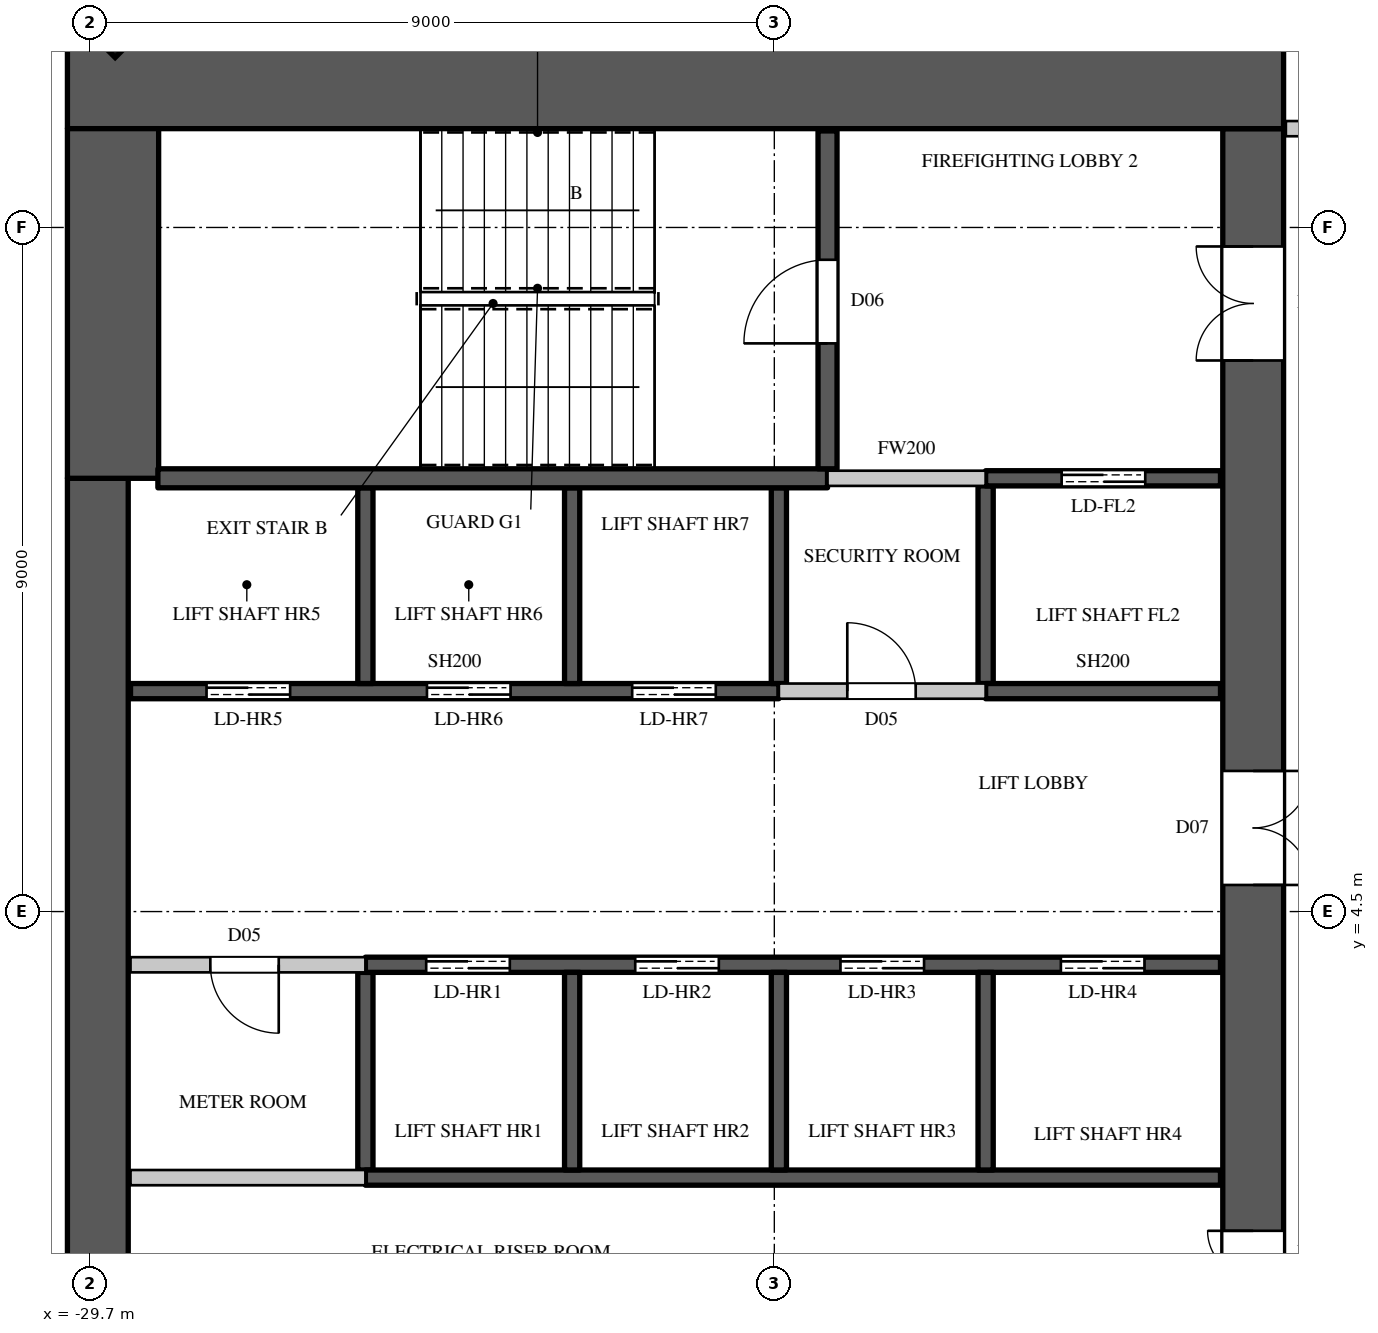
"""IFC4 building model, lengths in metres.
Left out: names, types, materials, properties, quantities, classifications, styles, units other than length and angle.
Written with IfcOpenShell. Run it as: python <this file> out.ifc"""

import sys

from ifc_helpers import new_model, si_unit, direction, frame, frame_2d, origin, origin_2d, place, context, subcontext, project, spatial, rectangle, extrude, element, fill, save


model = new_model("IFC4")
c1 = context("Model", 3, precision=1e-05, world=origin(), true_north=direction((0.0, 1.0)))
c2 = subcontext(c1, "Body", "Model", "MODEL_VIEW")
j1 = project(units=[si_unit("LENGTHUNIT", "METRE"), si_unit("PLANEANGLEUNIT", "RADIAN")], contexts=[c1])
p1 = place(None, origin())
s1 = spatial("IfcSite", under=j1, at=p1, CompositionType="ELEMENT")
p2 = place(p1, origin())
s2 = spatial("IfcBuilding", under=s1, at=p2, CompositionType="ELEMENT")
p3 = place(p2, frame((0.0, 0.0, 217.9)))
s3 = spatial("IfcBuildingStorey", under=s2, at=p3, CompositionType="ELEMENT", Elevation=217.9)
p4 = place(p3, frame((-29.443, 16.443, 0.0), z_axis=(0.0, 0.0, 1.0), x_axis=(-0.707106781187, -0.707106781187, 0.0)))
e1 = element("IfcColumn", 1, at=p4, inside=s3, PredefinedType="COLUMN", context=c2, shape_type="SweptSolid", body=[
    extrude(rectangle(XDim=0.9, YDim=1.1, at=origin_2d()), origin(), (0.0, 0.0, 1.0), 4.1),
])
p5 = place(p3, frame((-30.0, 15.4, 0.0), z_axis=(0.0, 0.0, 1.0), x_axis=(1.0, 0.0, 0.0)))
e2 = element("IfcWall", 2, at=p5, inside=s3, PredefinedType="SHEAR", context=c2, shape_type="SweptSolid", body=[
    extrude(rectangle(XDim=16.0, YDim=1.2, at=frame_2d((8.0, 0.0))), origin(), (0.0, 0.0, 1.0), 4.1),
])
p6 = place(p3, frame((-14.4, -14.8, 0.0), z_axis=(0.0, 0.0, 1.0), x_axis=(0.0, 1.0, 0.0)))
e3 = element("IfcWall", 3, at=p6, inside=s3, PredefinedType="SHEAR", context=c2, shape_type="SweptSolid", body=[
    extrude(rectangle(XDim=29.6, YDim=0.8, at=frame_2d((14.8, 0.0))), origin(), (0.0, 0.0, 1.0), 4.1),
])
p7 = place(p6, frame((1.55, 0.0, 0.0)))
e4 = element("IfcOpeningElement", 4, at=p7, cuts=e3, PredefinedType="OPENING", context=c2, shape_type="SweptSolid", body=[
    extrude(rectangle(XDim=1.5, YDim=2.4, at=frame_2d((0.75, 1.2))), frame((0.0, 0.41, 0.0), z_axis=(0.0, -1.0, 0.0), x_axis=(1.0, 0.0, 0.0)), (0.0, 0.0, 1.0), 0.82),
])
p8 = place(p6, frame((26.55, 0.0, 0.0)))
e5 = element("IfcOpeningElement", 5, at=p8, cuts=e3, PredefinedType="OPENING", context=c2, shape_type="SweptSolid", body=[
    extrude(rectangle(XDim=1.5, YDim=2.4, at=frame_2d((0.75, 1.2))), frame((0.0, 0.41, 0.0), z_axis=(0.0, -1.0, 0.0), x_axis=(1.0, 0.0, 0.0)), (0.0, 0.0, 1.0), 0.82),
])
p9 = place(p6, frame((8.45, 0.0, 0.0)))
e6 = element("IfcOpeningElement", 6, at=p9, cuts=e3, PredefinedType="OPENING", context=c2, shape_type="SweptSolid", body=[
    extrude(rectangle(XDim=1.5, YDim=2.4, at=frame_2d((0.75, 1.2))), frame((0.0, 0.41, 0.0), z_axis=(0.0, -1.0, 0.0), x_axis=(1.0, 0.0, 0.0)), (0.0, 0.0, 1.0), 0.82),
])
p10 = place(p6, frame((19.65, 0.0, 0.0)))
e7 = element("IfcOpeningElement", 7, at=p10, cuts=e3, PredefinedType="OPENING", context=c2, shape_type="SweptSolid", body=[
    extrude(rectangle(XDim=1.5, YDim=2.4, at=frame_2d((0.75, 1.2))), frame((0.0, 0.41, 0.0), z_axis=(0.0, -1.0, 0.0), x_axis=(1.0, 0.0, 0.0)), (0.0, 0.0, 1.0), 0.82),
])
p11 = place(p6, frame((14.5, 0.0, 0.0)))
e8 = element("IfcOpeningElement", 8, at=p11, cuts=e3, PredefinedType="OPENING", context=c2, shape_type="SweptSolid", body=[
    extrude(rectangle(XDim=0.6, YDim=2.0, at=frame_2d((0.3, 1.0))), frame((0.0, 0.41, 0.0), z_axis=(0.0, -1.0, 0.0), x_axis=(1.0, 0.0, 0.0)), (0.0, 0.0, 1.0), 0.82),
])
p12 = place(p3, frame((-29.6, -10.2, 0.0), z_axis=(0.0, 0.0, 1.0), x_axis=(0.0, 1.0, 0.0)))
e9 = element("IfcWall", 9, at=p12, inside=s3, PredefinedType="SHEAR", context=c2, shape_type="SweptSolid", body=[
    extrude(rectangle(XDim=20.4, YDim=0.8, at=frame_2d((10.2, 0.0))), origin(), (0.0, 0.0, 1.0), 4.1),
])
p13 = place(p3, frame((-29.4, 10.2, 0.0), z_axis=(0.0, 0.0, 1.0), x_axis=(0.0, 1.0, 0.0)))
e10 = element("IfcWall", 10, at=p13, inside=s3, PredefinedType="SHEAR", context=c2, shape_type="SweptSolid", body=[
    extrude(rectangle(XDim=4.6, YDim=1.2, at=frame_2d((2.3, 0.0))), origin(), (0.0, 0.0, 1.0), 4.1),
])
p14 = place(p3, frame((-20.64, 7.4, 0.0), z_axis=(0.0, 0.0, 1.0), x_axis=(1.0, 0.0, 0.0)))
e11 = element("IfcWall", 11, at=p14, inside=s3, PredefinedType="PARTITIONING", context=c2, shape_type="SweptSolid", body=[
    extrude(rectangle(XDim=2.72, YDim=0.2, at=frame_2d((1.36, 0.0))), origin(), (0.0, 0.0, 1.0), 3.8),
])
p15 = place(p14, frame((0.9, 0.0, 0.0)))
e12 = element("IfcOpeningElement", 12, at=p15, cuts=e11, PredefinedType="OPENING", context=c2, shape_type="SweptSolid", body=[
    extrude(rectangle(XDim=0.9, YDim=2.2, at=frame_2d((0.45, 1.1))), frame((0.0, 0.11, 0.0), z_axis=(0.0, -1.0, 0.0), x_axis=(1.0, 0.0, 0.0)), (0.0, 0.0, 1.0), 0.22),
])
p16 = place(p3, frame((-20.0, 10.2, 0.0), z_axis=(0.0, 0.0, 1.0), x_axis=(1.0, 0.0, 0.0)))
e13 = element("IfcWall", 13, at=p16, inside=s3, PredefinedType="PARTITIONING", context=c2, shape_type="SweptSolid", body=[
    extrude(rectangle(XDim=2.08, YDim=0.2, at=frame_2d((1.04, 0.0))), origin(), (0.0, 0.0, 1.0), 3.8),
])
p17 = place(p3, frame((-13.97, 14.8, 0.0), z_axis=(0.0, 0.0, 1.0), x_axis=(1.0, 0.0, 0.0)))
e14 = element("IfcWall", 14, at=p17, inside=s3, PredefinedType="PARTITIONING", context=c2, shape_type="SweptSolid", body=[
    extrude(rectangle(XDim=2.87, YDim=0.2, at=frame_2d((1.435, 0.0))), origin(), (0.0, 0.0, 1.0), 3.8),
])
p18 = place(p3, frame((-29.17, 1.0, 0.0), z_axis=(0.0, 0.0, 1.0), x_axis=(1.0, 0.0, 0.0)))
e15 = element("IfcWall", 15, at=p18, inside=s3, PredefinedType="PARTITIONING", context=c2, shape_type="SweptSolid", body=[
    extrude(rectangle(XDim=3.09, YDim=0.2, at=frame_2d((1.545, 0.0))), origin(), (0.0, 0.0, 1.0), 3.8),
])
p19 = place(p3, frame((-29.17, 3.8, 0.0), z_axis=(0.0, 0.0, 1.0), x_axis=(1.0, 0.0, 0.0)))
e16 = element("IfcWall", 16, at=p19, inside=s3, PredefinedType="PARTITIONING", context=c2, shape_type="SweptSolid", body=[
    extrude(rectangle(XDim=3.09, YDim=0.2, at=frame_2d((1.545, 0.0))), origin(), (0.0, 0.0, 1.0), 3.8),
])
p20 = place(p19, frame((1.05, 0.0, 0.0)))
e17 = element("IfcOpeningElement", 17, at=p20, cuts=e16, PredefinedType="OPENING", context=c2, shape_type="SweptSolid", body=[
    extrude(rectangle(XDim=0.9, YDim=2.2, at=frame_2d((0.45, 1.1))), frame((0.0, 0.11, 0.0), z_axis=(0.0, -1.0, 0.0), x_axis=(1.0, 0.0, 0.0)), (0.0, 0.0, 1.0), 0.22),
])
p21 = place(p3, frame((-29.17, 7.4, 0.0), z_axis=(0.0, 0.0, 1.0), x_axis=(1.0, 0.0, 0.0)))
e18 = element("IfcWall", 18, at=p21, inside=s3, PredefinedType="SHEAR", context=c2, shape_type="SweptSolid", body=[
    extrude(rectangle(XDim=8.53, YDim=0.2, at=frame_2d((4.265, 0.0))), origin(), (0.0, 0.0, 1.0), 3.8),
])
p22 = place(p21, frame((1.0, 0.0, 0.0)))
e19 = element("IfcOpeningElement", 19, at=p22, cuts=e18, PredefinedType="OPENING", context=c2, shape_type="SweptSolid", body=[
    extrude(rectangle(XDim=1.1, YDim=2.2, at=frame_2d((0.55, 1.1))), frame((0.0, 0.11, 0.0), z_axis=(0.0, -1.0, 0.0), x_axis=(1.0, 0.0, 0.0)), (0.0, 0.0, 1.0), 0.22),
])
p23 = place(p21, frame((3.9, 0.0, 0.0)))
e20 = element("IfcOpeningElement", 20, at=p23, cuts=e18, PredefinedType="OPENING", context=c2, shape_type="SweptSolid", body=[
    extrude(rectangle(XDim=1.1, YDim=2.2, at=frame_2d((0.55, 1.1))), frame((0.0, 0.11, 0.0), z_axis=(0.0, -1.0, 0.0), x_axis=(1.0, 0.0, 0.0)), (0.0, 0.0, 1.0), 0.22),
])
p24 = place(p21, frame((6.6, 0.0, 0.0)))
e21 = element("IfcOpeningElement", 21, at=p24, cuts=e18, PredefinedType="OPENING", context=c2, shape_type="SweptSolid", body=[
    extrude(rectangle(XDim=1.1, YDim=2.2, at=frame_2d((0.55, 1.1))), frame((0.0, 0.11, 0.0), z_axis=(0.0, -1.0, 0.0), x_axis=(1.0, 0.0, 0.0)), (0.0, 0.0, 1.0), 0.22),
])
p25 = place(p3, frame((-26.08, 1.1, 0.0), z_axis=(0.0, 0.0, 1.0), x_axis=(0.0, 1.0, 0.0)))
e22 = element("IfcWall", 22, at=p25, inside=s3, PredefinedType="SHEAR", context=c2, shape_type="SweptSolid", body=[
    extrude(rectangle(XDim=2.6, YDim=0.2, at=frame_2d((1.3, 0.0))), origin(), (0.0, 0.0, 1.0), 3.8),
])
p26 = place(p3, frame((-26.08, 1.0, 0.0), z_axis=(0.0, 0.0, 1.0), x_axis=(1.0, 0.0, 0.0)))
e23 = element("IfcWall", 23, at=p26, inside=s3, PredefinedType="SHEAR", context=c2, shape_type="SweptSolid", body=[
    extrude(rectangle(XDim=11.25, YDim=0.2, at=frame_2d((5.625, 0.0))), origin(), (0.0, 0.0, 1.0), 3.8),
])
p27 = place(p3, frame((-26.08, 3.8, 0.0), z_axis=(0.0, 0.0, 1.0), x_axis=(1.0, 0.0, 0.0)))
e24 = element("IfcWall", 24, at=p27, inside=s3, PredefinedType="SHEAR", context=c2, shape_type="SweptSolid", body=[
    extrude(rectangle(XDim=11.25, YDim=0.2, at=frame_2d((5.625, 0.0))), origin(), (0.0, 0.0, 1.0), 3.8),
])
p28 = place(p27, frame((0.8, 0.0, 0.0)))
e25 = element("IfcOpeningElement", 25, at=p28, cuts=e24, PredefinedType="OPENING", context=c2, shape_type="SweptSolid", body=[
    extrude(rectangle(XDim=1.1, YDim=2.2, at=frame_2d((0.55, 1.1))), frame((0.0, 0.11, 0.0), z_axis=(0.0, -1.0, 0.0), x_axis=(1.0, 0.0, 0.0)), (0.0, 0.0, 1.0), 0.22),
])
p29 = place(p27, frame((3.55, 0.0, 0.0)))
e26 = element("IfcOpeningElement", 26, at=p29, cuts=e24, PredefinedType="OPENING", context=c2, shape_type="SweptSolid", body=[
    extrude(rectangle(XDim=1.1, YDim=2.2, at=frame_2d((0.55, 1.1))), frame((0.0, 0.11, 0.0), z_axis=(0.0, -1.0, 0.0), x_axis=(1.0, 0.0, 0.0)), (0.0, 0.0, 1.0), 0.22),
])
p30 = place(p27, frame((6.25, 0.0, 0.0)))
e27 = element("IfcOpeningElement", 27, at=p30, cuts=e24, PredefinedType="OPENING", context=c2, shape_type="SweptSolid", body=[
    extrude(rectangle(XDim=1.1, YDim=2.2, at=frame_2d((0.55, 1.1))), frame((0.0, 0.11, 0.0), z_axis=(0.0, -1.0, 0.0), x_axis=(1.0, 0.0, 0.0)), (0.0, 0.0, 1.0), 0.22),
])
p31 = place(p27, frame((9.15, 0.0, 0.0)))
e28 = element("IfcOpeningElement", 28, at=p31, cuts=e24, PredefinedType="OPENING", context=c2, shape_type="SweptSolid", body=[
    extrude(rectangle(XDim=1.1, YDim=2.2, at=frame_2d((0.55, 1.1))), frame((0.0, 0.11, 0.0), z_axis=(0.0, -1.0, 0.0), x_axis=(1.0, 0.0, 0.0)), (0.0, 0.0, 1.0), 0.22),
])
p32 = place(p3, frame((-26.08, 7.5, 0.0), z_axis=(0.0, 0.0, 1.0), x_axis=(0.0, 1.0, 0.0)))
e29 = element("IfcWall", 29, at=p32, inside=s3, PredefinedType="SHEAR", context=c2, shape_type="SweptSolid", body=[
    extrude(rectangle(XDim=2.575, YDim=0.2, at=frame_2d((1.288, 0.0))), origin(), (0.0, 0.0, 1.0), 4.1),
])
p33 = place(p3, frame((-23.36, 1.1, 0.0), z_axis=(0.0, 0.0, 1.0), x_axis=(0.0, 1.0, 0.0)))
e30 = element("IfcWall", 30, at=p33, inside=s3, PredefinedType="SHEAR", context=c2, shape_type="SweptSolid", body=[
    extrude(rectangle(XDim=2.6, YDim=0.2, at=frame_2d((1.3, 0.0))), origin(), (0.0, 0.0, 1.0), 4.1),
])
p34 = place(p3, frame((-23.36, 7.5, 0.0), z_axis=(0.0, 0.0, 1.0), x_axis=(0.0, 1.0, 0.0)))
e31 = element("IfcWall", 31, at=p34, inside=s3, PredefinedType="SHEAR", context=c2, shape_type="SweptSolid", body=[
    extrude(rectangle(XDim=2.575, YDim=0.2, at=frame_2d((1.288, 0.0))), origin(), (0.0, 0.0, 1.0), 4.1),
])
p35 = place(p3, frame((-20.64, 1.1, 0.0), z_axis=(0.0, 0.0, 1.0), x_axis=(0.0, 1.0, 0.0)))
e32 = element("IfcWall", 32, at=p35, inside=s3, PredefinedType="SHEAR", context=c2, shape_type="SweptSolid", body=[
    extrude(rectangle(XDim=2.6, YDim=0.2, at=frame_2d((1.3, 0.0))), origin(), (0.0, 0.0, 1.0), 4.1),
])
p36 = place(p3, frame((-20.64, 7.5, 0.0), z_axis=(0.0, 0.0, 1.0), x_axis=(0.0, 1.0, 0.0)))
e33 = element("IfcWall", 33, at=p36, inside=s3, PredefinedType="SHEAR", context=c2, shape_type="SweptSolid", body=[
    extrude(rectangle(XDim=2.575, YDim=0.2, at=frame_2d((1.288, 0.0))), origin(), (0.0, 0.0, 1.0), 3.8),
])
p37 = place(p3, frame((-17.92, 1.1, 0.0), z_axis=(0.0, 0.0, 1.0), x_axis=(0.0, 1.0, 0.0)))
e34 = element("IfcWall", 34, at=p37, inside=s3, PredefinedType="SHEAR", context=c2, shape_type="SweptSolid", body=[
    extrude(rectangle(XDim=2.6, YDim=0.2, at=frame_2d((1.3, 0.0))), origin(), (0.0, 0.0, 1.0), 4.1),
])
p38 = place(p3, frame((-17.92, 7.5, 0.0), z_axis=(0.0, 0.0, 1.0), x_axis=(0.0, 1.0, 0.0)))
e35 = element("IfcWall", 35, at=p38, inside=s3, PredefinedType="SHEAR", context=c2, shape_type="SweptSolid", body=[
    extrude(rectangle(XDim=2.6, YDim=0.2, at=frame_2d((1.3, 0.0))), origin(), (0.0, 0.0, 1.0), 3.8),
])
p39 = place(p3, frame((-17.92, 7.4, 0.0), z_axis=(0.0, 0.0, 1.0), x_axis=(1.0, 0.0, 0.0)))
e36 = element("IfcWall", 36, at=p39, inside=s3, PredefinedType="SHEAR", context=c2, shape_type="SweptSolid", body=[
    extrude(rectangle(XDim=3.09, YDim=0.2, at=frame_2d((1.545, 0.0))), origin(), (0.0, 0.0, 1.0), 3.8),
])
p40 = place(p3, frame((-17.92, 10.2, 0.0), z_axis=(0.0, 0.0, 1.0), x_axis=(1.0, 0.0, 0.0)))
e37 = element("IfcWall", 37, at=p40, inside=s3, PredefinedType="SHEAR", context=c2, shape_type="SweptSolid", body=[
    extrude(rectangle(XDim=3.09, YDim=0.2, at=frame_2d((1.545, 0.0))), origin(), (0.0, 0.0, 1.0), 3.8),
])
p41 = place(p40, frame((1.0, 0.0, 0.0)))
e38 = element("IfcOpeningElement", 38, at=p41, cuts=e37, PredefinedType="OPENING", context=c2, shape_type="SweptSolid", body=[
    extrude(rectangle(XDim=1.1, YDim=2.2, at=frame_2d((0.55, 1.1))), frame((0.0, 0.11, 0.0), z_axis=(0.0, -1.0, 0.0), x_axis=(1.0, 0.0, 0.0)), (0.0, 0.0, 1.0), 0.22),
])
p42 = place(p3, frame((-28.81, 10.2, 0.0), z_axis=(0.0, 0.0, 1.0), x_axis=(1.0, 0.0, 0.0)))
e39 = element("IfcWall", 39, at=p42, inside=s3, PredefinedType="SHEAR", context=c2, shape_type="SweptSolid", body=[
    extrude(rectangle(XDim=8.81, YDim=0.25, at=frame_2d((4.405, 0.0))), origin(), (0.0, 0.0, 1.0), 3.8),
])
p43 = place(p3, frame((-20.0, 10.325, 0.0), z_axis=(0.0, 0.0, 1.0), x_axis=(0.0, 1.0, 0.0)))
e40 = element("IfcWall", 40, at=p43, inside=s3, PredefinedType="SHEAR", context=c2, shape_type="SweptSolid", body=[
    extrude(rectangle(XDim=4.445, YDim=0.25, at=frame_2d((2.223, 0.0))), origin(), (0.0, 0.0, 1.0), 3.8),
])
p44 = place(p43, frame((1.65, 0.0, 0.0)))
e41 = element("IfcOpeningElement", 41, at=p44, cuts=e40, PredefinedType="OPENING", context=c2, shape_type="SweptSolid", body=[
    extrude(rectangle(XDim=1.1, YDim=2.2, at=frame_2d((0.55, 1.1))), frame((0.0, 0.135, 0.0), z_axis=(0.0, -1.0, 0.0), x_axis=(1.0, 0.0, 0.0)), (0.0, 0.0, 1.0), 0.27),
])
p45 = place(p44, origin())
e42 = element("IfcDoor", 42, at=p45, inside=s3, OperationType="SINGLE_SWING_LEFT", PredefinedType="DOOR", context=c2, shape_type="SweptSolid", body=[
    extrude(rectangle(XDim=1.1, YDim=2.2, at=frame_2d((0.55, 1.1))), frame((0.0, 0.025, 0.0), z_axis=(0.0, -1.0, 0.0), x_axis=(1.0, 0.0, 0.0)), (0.0, 0.0, 1.0), 0.05),
])
fill(e41, e42)
p46 = place(p20, origin())
e43 = element("IfcDoor", 43, at=p46, inside=s3, OperationType="SINGLE_SWING_LEFT", PredefinedType="DOOR", context=c2, shape_type="SweptSolid", body=[
    extrude(rectangle(XDim=0.9, YDim=2.2, at=frame_2d((0.45, 1.1))), frame((0.0, 0.025, 0.0), z_axis=(0.0, -1.0, 0.0), x_axis=(1.0, 0.0, 0.0)), (0.0, 0.0, 1.0), 0.05),
])
fill(e17, e43)
p47 = place(p15, origin())
e44 = element("IfcDoor", 44, at=p47, inside=s3, OperationType="SINGLE_SWING_LEFT", PredefinedType="DOOR", context=c2, shape_type="SweptSolid", body=[
    extrude(rectangle(XDim=0.9, YDim=2.2, at=frame_2d((0.45, 1.1))), frame((0.0, 0.025, 0.0), z_axis=(0.0, -1.0, 0.0), x_axis=(1.0, 0.0, 0.0)), (0.0, 0.0, 1.0), 0.05),
])
fill(e12, e44)
p48 = place(p28, origin())
e45 = element("IfcDoor", 45, at=p48, inside=s3, OperationType="DOUBLE_DOOR_SLIDING", PredefinedType="DOOR", context=c2, shape_type="SweptSolid", body=[
    extrude(rectangle(XDim=1.1, YDim=2.2, at=frame_2d((0.55, 1.1))), frame((0.0, 0.025, 0.0), z_axis=(0.0, -1.0, 0.0), x_axis=(1.0, 0.0, 0.0)), (0.0, 0.0, 1.0), 0.05),
])
fill(e25, e45)
p49 = place(p29, origin())
e46 = element("IfcDoor", 46, at=p49, inside=s3, OperationType="DOUBLE_DOOR_SLIDING", PredefinedType="DOOR", context=c2, shape_type="SweptSolid", body=[
    extrude(rectangle(XDim=1.1, YDim=2.2, at=frame_2d((0.55, 1.1))), frame((0.0, 0.025, 0.0), z_axis=(0.0, -1.0, 0.0), x_axis=(1.0, 0.0, 0.0)), (0.0, 0.0, 1.0), 0.05),
])
fill(e26, e46)
p50 = place(p30, origin())
e47 = element("IfcDoor", 47, at=p50, inside=s3, OperationType="DOUBLE_DOOR_SLIDING", PredefinedType="DOOR", context=c2, shape_type="SweptSolid", body=[
    extrude(rectangle(XDim=1.1, YDim=2.2, at=frame_2d((0.55, 1.1))), frame((0.0, 0.025, 0.0), z_axis=(0.0, -1.0, 0.0), x_axis=(1.0, 0.0, 0.0)), (0.0, 0.0, 1.0), 0.05),
])
fill(e27, e47)
p51 = place(p31, origin())
e48 = element("IfcDoor", 48, at=p51, inside=s3, OperationType="DOUBLE_DOOR_SLIDING", PredefinedType="DOOR", context=c2, shape_type="SweptSolid", body=[
    extrude(rectangle(XDim=1.1, YDim=2.2, at=frame_2d((0.55, 1.1))), frame((0.0, 0.025, 0.0), z_axis=(0.0, -1.0, 0.0), x_axis=(1.0, 0.0, 0.0)), (0.0, 0.0, 1.0), 0.05),
])
fill(e28, e48)
p52 = place(p22, origin())
e49 = element("IfcDoor", 49, at=p52, inside=s3, OperationType="DOUBLE_DOOR_SLIDING", PredefinedType="DOOR", context=c2, shape_type="SweptSolid", body=[
    extrude(rectangle(XDim=1.1, YDim=2.2, at=frame_2d((0.55, 1.1))), frame((0.0, 0.025, 0.0), z_axis=(0.0, -1.0, 0.0), x_axis=(1.0, 0.0, 0.0)), (0.0, 0.0, 1.0), 0.05),
])
fill(e19, e49)
p53 = place(p23, origin())
e50 = element("IfcDoor", 50, at=p53, inside=s3, OperationType="DOUBLE_DOOR_SLIDING", PredefinedType="DOOR", context=c2, shape_type="SweptSolid", body=[
    extrude(rectangle(XDim=1.1, YDim=2.2, at=frame_2d((0.55, 1.1))), frame((0.0, 0.025, 0.0), z_axis=(0.0, -1.0, 0.0), x_axis=(1.0, 0.0, 0.0)), (0.0, 0.0, 1.0), 0.05),
])
fill(e20, e50)
p54 = place(p24, origin())
e51 = element("IfcDoor", 51, at=p54, inside=s3, OperationType="DOUBLE_DOOR_SLIDING", PredefinedType="DOOR", context=c2, shape_type="SweptSolid", body=[
    extrude(rectangle(XDim=1.1, YDim=2.2, at=frame_2d((0.55, 1.1))), frame((0.0, 0.025, 0.0), z_axis=(0.0, -1.0, 0.0), x_axis=(1.0, 0.0, 0.0)), (0.0, 0.0, 1.0), 0.05),
])
fill(e21, e51)
p55 = place(p41, origin())
e52 = element("IfcDoor", 52, at=p55, inside=s3, OperationType="DOUBLE_DOOR_SLIDING", PredefinedType="DOOR", context=c2, shape_type="SweptSolid", body=[
    extrude(rectangle(XDim=1.1, YDim=2.2, at=frame_2d((0.55, 1.1))), frame((0.0, 0.025, 0.0), z_axis=(0.0, -1.0, 0.0), x_axis=(1.0, 0.0, 0.0)), (0.0, 0.0, 1.0), 0.05),
])
fill(e38, e52)
p56 = place(p8, origin())
e53 = element("IfcDoor", 53, at=p56, inside=s3, OperationType="DOUBLE_DOOR_SINGLE_SWING", PredefinedType="DOOR", context=c2, shape_type="SweptSolid", body=[
    extrude(rectangle(XDim=1.5, YDim=2.4, at=frame_2d((0.75, 1.2))), frame((0.0, 0.395, 0.0), z_axis=(0.0, -1.0, 0.0), x_axis=(1.0, 0.0, 0.0)), (0.0, 0.0, 1.0), 0.05),
])
fill(e5, e53)
p57 = place(p10, origin())
e54 = element("IfcDoor", 54, at=p57, inside=s3, OperationType="DOUBLE_DOOR_SINGLE_SWING", PredefinedType="DOOR", context=c2, shape_type="SweptSolid", body=[
    extrude(rectangle(XDim=1.5, YDim=2.4, at=frame_2d((0.75, 1.2))), frame((0.0, -0.345, 0.0), z_axis=(0.0, -1.0, 0.0), x_axis=(1.0, 0.0, 0.0)), (0.0, 0.0, 1.0), 0.05),
])
fill(e7, e54)
p58 = place(p11, origin())
e55 = element("IfcDoor", 55, at=p58, inside=s3, OperationType="SINGLE_SWING_RIGHT", PredefinedType="DOOR", context=c2, shape_type="SweptSolid", body=[
    extrude(rectangle(XDim=0.6, YDim=2.0, at=frame_2d((0.3, 1.0))), frame((0.0, 0.395, 0.0), z_axis=(0.0, -1.0, 0.0), x_axis=(1.0, 0.0, 0.0)), (0.0, 0.0, 1.0), 0.05),
])
fill(e8, e55)
save(model, sys.argv[1])
